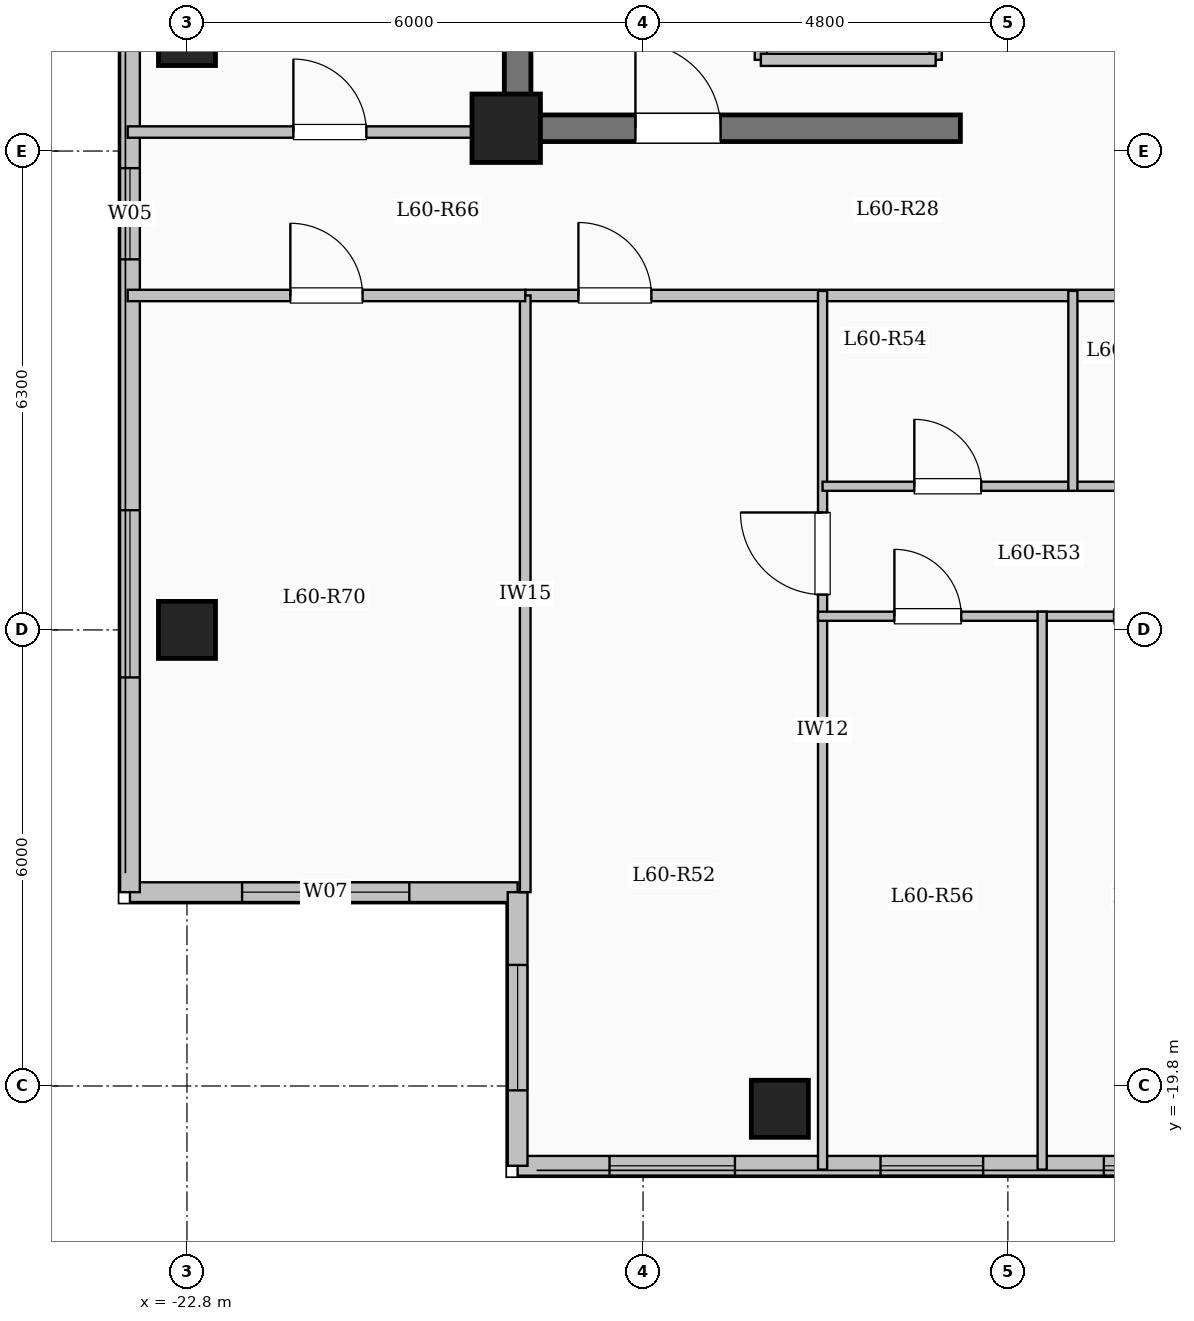
"""IFC4 building model, lengths in metres.
Left out: names, types, materials, properties, quantities, classifications, styles, units other than length and angle.
Written with IfcOpenShell. Run it as: python <this file> out.ifc"""

import sys

from ifc_helpers import new_model, si_unit, direction, frame, frame_2d, origin, origin_2d, place, context, subcontext, project, spatial, rectangle, extrude, element, fill, save


model = new_model("IFC4")
c1 = context("Model", 3, precision=1e-05, world=origin(), true_north=direction((0.0, 1.0)))
c2 = subcontext(c1, "Body", "Model", "MODEL_VIEW")
j1 = project(units=[si_unit("LENGTHUNIT", "METRE"), si_unit("PLANEANGLEUNIT", "RADIAN")], contexts=[c1])
p1 = place(None, origin())
s1 = spatial("IfcSite", under=j1, at=p1, CompositionType="ELEMENT")
p2 = place(p1, origin())
s2 = spatial("IfcBuilding", under=s1, at=p2, CompositionType="ELEMENT")
p3 = place(p2, frame((0.0, 0.0, 220.4)))
s3 = spatial("IfcBuildingStorey", under=s2, at=p3, CompositionType="ELEMENT", Elevation=220.4)
p4 = place(p3, frame((-18.6, -7.2, 0.0), z_axis=(0.0, 0.0, 1.0), x_axis=(1.0, 0.0, 0.0)))
e1 = element("IfcColumn", 1, at=p4, inside=s3, PredefinedType="COLUMN", context=c2, shape_type="SweptSolid", body=[
    extrude(rectangle(XDim=0.9, YDim=0.9, at=origin_2d()), origin(), (0.0, 0.0, 1.0), 3.35),
])
for number, where, z_axis, x_axis in (
    (2, (-15.0, -20.1, 0.0), (0.0, 0.0, 1.0), (1.0, 0.0, 0.0)),
    (3, (-22.8, -13.8, 0.0), (0.0, 0.0, 1.0), (1.0, 0.0, 0.0)),
    (4, (-22.8, -6.0, 0.0), (0.0, 0.0, 1.0), (1.0, 0.0, 0.0)),
):
    element("IfcColumn", number, at=place(p3, frame(where, z_axis=z_axis, x_axis=x_axis)), inside=s3, PredefinedType="COLUMN", context=c2, shape_type="SweptSolid", body=[
        extrude(rectangle(XDim=0.75, YDim=0.75, at=origin_2d()), origin(), (0.0, 0.0, 1.0), 3.35),
    ])
p5 = place(p3, frame((-18.45, -17.25, 0.0), z_axis=(0.0, 0.0, 1.0), x_axis=(-1.0, 0.0, 0.0)))
e5 = element("IfcWall", 5, at=p5, inside=s3, PredefinedType="SOLIDWALL", context=c2, shape_type="SweptSolid", body=[
    extrude(rectangle(XDim=5.1, YDim=0.26, at=frame_2d((2.55, 0.0))), origin(), (0.0, 0.0, 1.0), 3.1),
])
p6 = place(p5, frame((1.425, 0.0, 0.9)))
e6 = element("IfcOpeningElement", 6, at=p6, cuts=e5, PredefinedType="OPENING", context=c2, shape_type="SweptSolid", body=[
    extrude(rectangle(XDim=2.2, YDim=1.75, at=frame_2d((1.1, 0.875))), frame((0.0, 0.14, 0.0), z_axis=(0.0, -1.0, 0.0), x_axis=(1.0, 0.0, 0.0)), (0.0, 0.0, 1.0), 0.28),
])
p7 = place(p3, frame((-23.55, -17.25, 0.0), z_axis=(0.0, 0.0, 1.0), x_axis=(0.0, 1.0, 0.0)))
e7 = element("IfcWall", 7, at=p7, inside=s3, PredefinedType="SOLIDWALL", context=c2, shape_type="SweptSolid", body=[
    extrude(rectangle(XDim=34.5, YDim=0.26, at=frame_2d((17.25, 0.0))), origin(), (0.0, 0.0, 1.0), 3.1),
])
p8 = place(p7, frame((2.825, 0.0, 0.9)))
e8 = element("IfcOpeningElement", 8, at=p8, cuts=e7, PredefinedType="OPENING", context=c2, shape_type="SweptSolid", body=[
    extrude(rectangle(XDim=2.2, YDim=1.75, at=frame_2d((1.1, 0.875))), frame((0.0, 0.14, 0.0), z_axis=(0.0, -1.0, 0.0), x_axis=(1.0, 0.0, 0.0)), (0.0, 0.0, 1.0), 0.28),
])
p9 = place(p7, frame((8.325, 0.0, 0.95)))
e9 = element("IfcOpeningElement", 9, at=p9, cuts=e7, PredefinedType="OPENING", context=c2, shape_type="SweptSolid", body=[
    extrude(rectangle(XDim=1.2, YDim=1.5, at=frame_2d((0.6, 0.75))), frame((0.0, 0.14, 0.0), z_axis=(0.0, -1.0, 0.0), x_axis=(1.0, 0.0, 0.0)), (0.0, 0.0, 1.0), 0.28),
])
p10 = place(p7, frame((13.25, 0.0, 0.9)))
e10 = element("IfcOpeningElement", 10, at=p10, cuts=e7, PredefinedType="OPENING", context=c2, shape_type="SweptSolid", body=[
    extrude(rectangle(XDim=2.2, YDim=1.75, at=frame_2d((1.1, 0.875))), frame((0.0, 0.14, 0.0), z_axis=(0.0, -1.0, 0.0), x_axis=(1.0, 0.0, 0.0)), (0.0, 0.0, 1.0), 0.28),
])
p11 = place(p7, frame((19.65, 0.0, 0.9)))
e11 = element("IfcOpeningElement", 11, at=p11, cuts=e7, PredefinedType="OPENING", context=c2, shape_type="SweptSolid", body=[
    extrude(rectangle(XDim=1.65, YDim=1.6, at=frame_2d((0.825, 0.8))), frame((0.0, 0.14, 0.0), z_axis=(0.0, -1.0, 0.0), x_axis=(1.0, 0.0, 0.0)), (0.0, 0.0, 1.0), 0.28),
])
p12 = place(p7, frame((24.125, 0.0, 0.9)))
e12 = element("IfcOpeningElement", 12, at=p12, cuts=e7, PredefinedType="OPENING", context=c2, shape_type="SweptSolid", body=[
    extrude(rectangle(XDim=2.0, YDim=1.7, at=frame_2d((1.0, 0.85))), frame((0.0, 0.14, 0.0), z_axis=(0.0, -1.0, 0.0), x_axis=(1.0, 0.0, 0.0)), (0.0, 0.0, 1.0), 0.28),
])
p13 = place(p7, frame((28.375, 0.0, 0.95)))
e13 = element("IfcOpeningElement", 13, at=p13, cuts=e7, PredefinedType="OPENING", context=c2, shape_type="SweptSolid", body=[
    extrude(rectangle(XDim=1.0, YDim=1.5, at=frame_2d((0.5, 0.75))), frame((0.0, 0.14, 0.0), z_axis=(0.0, -1.0, 0.0), x_axis=(1.0, 0.0, 0.0)), (0.0, 0.0, 1.0), 0.28),
])
p14 = place(p7, frame((31.125, 0.0, 0.9)))
e14 = element("IfcOpeningElement", 14, at=p14, cuts=e7, PredefinedType="OPENING", context=c2, shape_type="SweptSolid", body=[
    extrude(rectangle(XDim=2.0, YDim=1.7, at=frame_2d((1.0, 0.85))), frame((0.0, 0.14, 0.0), z_axis=(0.0, -1.0, 0.0), x_axis=(1.0, 0.0, 0.0)), (0.0, 0.0, 1.0), 0.28),
])
p15 = place(p3, frame((-7.35, -20.85, 0.0), z_axis=(0.0, 0.0, 1.0), x_axis=(-1.0, 0.0, 0.0)))
e15 = element("IfcWall", 15, at=p15, inside=s3, PredefinedType="SOLIDWALL", context=c2, shape_type="SweptSolid", body=[
    extrude(rectangle(XDim=11.1, YDim=0.26, at=frame_2d((5.55, 0.0))), origin(), (0.0, 0.0, 1.0), 3.1),
])
p16 = place(p15, frame((2.037, 0.0, 0.95)))
e16 = element("IfcOpeningElement", 16, at=p16, cuts=e15, PredefinedType="OPENING", context=c2, shape_type="SweptSolid", body=[
    extrude(rectangle(XDim=1.35, YDim=1.55, at=frame_2d((0.675, 0.775))), frame((0.0, 0.14, 0.0), z_axis=(0.0, -1.0, 0.0), x_axis=(1.0, 0.0, 0.0)), (0.0, 0.0, 1.0), 0.28),
])
p17 = place(p15, frame((4.976, 0.0, 0.95)))
e17 = element("IfcOpeningElement", 17, at=p17, cuts=e15, PredefinedType="OPENING", context=c2, shape_type="SweptSolid", body=[
    extrude(rectangle(XDim=1.35, YDim=1.55, at=frame_2d((0.675, 0.775))), frame((0.0, 0.14, 0.0), z_axis=(0.0, -1.0, 0.0), x_axis=(1.0, 0.0, 0.0)), (0.0, 0.0, 1.0), 0.28),
])
p18 = place(p15, frame((8.241, 0.0, 0.9)))
e18 = element("IfcOpeningElement", 18, at=p18, cuts=e15, PredefinedType="OPENING", context=c2, shape_type="SweptSolid", body=[
    extrude(rectangle(XDim=1.65, YDim=1.6, at=frame_2d((0.825, 0.8))), frame((0.0, 0.14, 0.0), z_axis=(0.0, -1.0, 0.0), x_axis=(1.0, 0.0, 0.0)), (0.0, 0.0, 1.0), 0.28),
])
p19 = place(p3, frame((-18.45, -20.85, 0.0), z_axis=(0.0, 0.0, 1.0), x_axis=(0.0, 1.0, 0.0)))
e19 = element("IfcWall", 19, at=p19, inside=s3, PredefinedType="SOLIDWALL", context=c2, shape_type="SweptSolid", body=[
    extrude(rectangle(XDim=3.6, YDim=0.26, at=frame_2d((1.8, 0.0))), origin(), (0.0, 0.0, 1.0), 3.1),
])
p20 = place(p19, frame((0.992, 0.0, 0.9)))
e20 = element("IfcOpeningElement", 20, at=p20, cuts=e19, PredefinedType="OPENING", context=c2, shape_type="SweptSolid", body=[
    extrude(rectangle(XDim=1.65, YDim=1.6, at=frame_2d((0.825, 0.8))), frame((0.0, 0.14, 0.0), z_axis=(0.0, -1.0, 0.0), x_axis=(1.0, 0.0, 0.0)), (0.0, 0.0, 1.0), 0.28),
])
p21 = place(p3, frame((-15.25, -6.3, 0.0), z_axis=(0.0, 0.0, 1.0), x_axis=(0.0, 1.0, 0.0)))
e21 = element("IfcWall", 21, at=p21, inside=s3, PredefinedType="SOLIDWALL", context=c2, shape_type="SweptSolid", body=[
    extrude(rectangle(XDim=2.6, YDim=0.16, at=frame_2d((1.3, 0.0))), origin(), (0.0, 0.0, 1.0), 3.1),
])
p22 = place(p21, frame((0.75, 0.0, 0.0)))
e22 = element("IfcOpeningElement", 22, at=p22, cuts=e21, PredefinedType="OPENING", context=c2, shape_type="SweptSolid", body=[
    extrude(rectangle(XDim=1.1, YDim=2.15, at=frame_2d((0.55, 1.075))), frame((0.0, 0.09, 0.0), z_axis=(0.0, -1.0, 0.0), x_axis=(1.0, 0.0, 0.0)), (0.0, 0.0, 1.0), 0.18),
])
p23 = place(p3, frame((-12.95, -6.3, 0.0), z_axis=(0.0, 0.0, 1.0), x_axis=(0.0, 1.0, 0.0)))
e23 = element("IfcWall", 23, at=p23, inside=s3, PredefinedType="SOLIDWALL", context=c2, shape_type="SweptSolid", body=[
    extrude(rectangle(XDim=2.6, YDim=0.16, at=frame_2d((1.3, 0.0))), origin(), (0.0, 0.0, 1.0), 3.1),
])
p24 = place(p3, frame((-15.25, -6.3, 0.0), z_axis=(0.0, 0.0, 1.0), x_axis=(1.0, 0.0, 0.0)))
e24 = element("IfcWall", 24, at=p24, inside=s3, PredefinedType="SOLIDWALL", context=c2, shape_type="SweptSolid", body=[
    extrude(rectangle(XDim=2.3, YDim=0.16, at=frame_2d((1.15, 0.0))), origin(), (0.0, 0.0, 1.0), 3.1),
])
p25 = place(p3, frame((-18.45, -7.375, 0.0), z_axis=(0.0, 0.0, 1.0), x_axis=(0.0, 1.0, 0.0)))
e25 = element("IfcWall", 25, at=p25, inside=s3, PredefinedType="SHEAR", context=c2, shape_type="SweptSolid", body=[
    extrude(rectangle(XDim=14.05, YDim=0.35, at=frame_2d((7.025, 0.0))), origin(), (0.0, 0.0, 1.0), 3.35),
])
p26 = place(p3, frame((-18.625, -7.2, 0.0), z_axis=(0.0, 0.0, 1.0), x_axis=(1.0, 0.0, 0.0)))
e26 = element("IfcWall", 26, at=p26, inside=s3, PredefinedType="SHEAR", context=c2, shape_type="SweptSolid", body=[
    extrude(rectangle(XDim=6.0, YDim=0.35, at=frame_2d((3.0, 0.0))), origin(), (0.0, 0.0, 1.0), 3.35),
])
p27 = place(p26, frame((1.725, 0.0, 0.0)))
e27 = element("IfcOpeningElement", 27, at=p27, cuts=e26, PredefinedType="OPENING", context=c2, shape_type="SweptSolid", body=[
    extrude(rectangle(XDim=1.12, YDim=2.15, at=frame_2d((0.56, 1.075))), frame((0.0, 0.185, 0.0), z_axis=(0.0, -1.0, 0.0), x_axis=(1.0, 0.0, 0.0)), (0.0, 0.0, 1.0), 0.37),
])
p28 = place(p3, frame((-18.35, -9.4, 0.0), z_axis=(0.0, 0.0, 1.0), x_axis=(1.0, 0.0, 0.0)))
e28 = element("IfcWall", 28, at=p28, inside=s3, PredefinedType="PARTITIONING", context=c2, shape_type="SweptSolid", body=[
    extrude(rectangle(XDim=9.8, YDim=0.15, at=frame_2d((4.9, 0.0))), origin(), (0.0, 0.0, 1.0), 3.1),
])
p29 = place(p28, frame((0.7, 0.0, 0.0)))
e29 = element("IfcOpeningElement", 29, at=p29, cuts=e28, PredefinedType="OPENING", context=c2, shape_type="SweptSolid", body=[
    extrude(rectangle(XDim=0.96, YDim=2.15, at=frame_2d((0.48, 1.075))), frame((0.0, 0.085, 0.0), z_axis=(0.0, -1.0, 0.0), x_axis=(1.0, 0.0, 0.0)), (0.0, 0.0, 1.0), 0.17),
])
p30 = place(p3, frame((-14.438, -20.9, 0.0), z_axis=(0.0, 0.0, 1.0), x_axis=(0.0, 1.0, 0.0)))
e30 = element("IfcWall", 30, at=p30, inside=s3, PredefinedType="PARTITIONING", context=c2, shape_type="SweptSolid", body=[
    extrude(rectangle(XDim=11.56, YDim=0.12, at=frame_2d((5.78, 0.0))), origin(), (0.0, 0.0, 1.0), 3.1),
])
p31 = place(p30, frame((7.565, 0.0, 0.0)))
e31 = element("IfcOpeningElement", 31, at=p31, cuts=e30, PredefinedType="OPENING", context=c2, shape_type="SweptSolid", body=[
    extrude(rectangle(XDim=1.08, YDim=2.15, at=frame_2d((0.54, 1.075))), frame((0.0, 0.07, 0.0), z_axis=(0.0, -1.0, 0.0), x_axis=(1.0, 0.0, 0.0)), (0.0, 0.0, 1.0), 0.14),
])
p32 = place(p3, frame((-14.438, -11.91, 0.0), z_axis=(0.0, 0.0, 1.0), x_axis=(1.0, 0.0, 0.0)))
e32 = element("IfcWall", 32, at=p32, inside=s3, PredefinedType="PARTITIONING", context=c2, shape_type="SweptSolid", body=[
    extrude(rectangle(XDim=3.293, YDim=0.12, at=frame_2d((1.646, 0.0))), origin(), (0.0, 0.0, 1.0), 3.1),
])
p33 = place(p32, frame((1.207, 0.0, 0.0)))
e33 = element("IfcOpeningElement", 33, at=p33, cuts=e32, PredefinedType="OPENING", context=c2, shape_type="SweptSolid", body=[
    extrude(rectangle(XDim=0.88, YDim=2.1, at=frame_2d((0.44, 1.05))), frame((0.0, 0.07, 0.0), z_axis=(0.0, -1.0, 0.0), x_axis=(1.0, 0.0, 0.0)), (0.0, 0.0, 1.0), 0.14),
])
p34 = place(p3, frame((-11.145, -11.91, 0.0), z_axis=(0.0, 0.0, 1.0), x_axis=(1.0, 0.0, 0.0)))
e34 = element("IfcWall", 34, at=p34, inside=s3, PredefinedType="PARTITIONING", context=c2, shape_type="SweptSolid", body=[
    extrude(rectangle(XDim=2.545, YDim=0.12, at=frame_2d((1.272, 0.0))), origin(), (0.0, 0.0, 1.0), 3.1),
])
p35 = place(p34, frame((0.833, 0.0, 0.0)))
e35 = element("IfcOpeningElement", 35, at=p35, cuts=e34, PredefinedType="OPENING", context=c2, shape_type="SweptSolid", body=[
    extrude(rectangle(XDim=0.88, YDim=2.1, at=frame_2d((0.44, 1.05))), frame((0.0, 0.07, 0.0), z_axis=(0.0, -1.0, 0.0), x_axis=(1.0, 0.0, 0.0)), (0.0, 0.0, 1.0), 0.14),
])
p36 = place(p3, frame((-14.498, -13.62, 0.0), z_axis=(0.0, 0.0, 1.0), x_axis=(1.0, 0.0, 0.0)))
e36 = element("IfcWall", 36, at=p36, inside=s3, PredefinedType="PARTITIONING", context=c2, shape_type="SweptSolid", body=[
    extrude(rectangle(XDim=5.958, YDim=0.12, at=frame_2d((2.979, 0.0))), origin(), (0.0, 0.0, 1.0), 3.1),
])
p37 = place(p36, frame((1.005, 0.0, 0.0)))
e37 = element("IfcOpeningElement", 37, at=p37, cuts=e36, PredefinedType="OPENING", context=c2, shape_type="SweptSolid", body=[
    extrude(rectangle(XDim=0.88, YDim=2.1, at=frame_2d((0.44, 1.05))), frame((0.0, 0.07, 0.0), z_axis=(0.0, -1.0, 0.0), x_axis=(1.0, 0.0, 0.0)), (0.0, 0.0, 1.0), 0.14),
])
p38 = place(p36, frame((3.894, 0.0, 0.0)))
e38 = element("IfcOpeningElement", 38, at=p38, cuts=e36, PredefinedType="OPENING", context=c2, shape_type="SweptSolid", body=[
    extrude(rectangle(XDim=0.88, YDim=2.1, at=frame_2d((0.44, 1.05))), frame((0.0, 0.07, 0.0), z_axis=(0.0, -1.0, 0.0), x_axis=(1.0, 0.0, 0.0)), (0.0, 0.0, 1.0), 0.14),
])
p39 = place(p3, frame((-11.145, -11.97, 0.0), z_axis=(0.0, 0.0, 1.0), x_axis=(0.0, 1.0, 0.0)))
e39 = element("IfcWall", 39, at=p39, inside=s3, PredefinedType="PARTITIONING", context=c2, shape_type="SweptSolid", body=[
    extrude(rectangle(XDim=2.63, YDim=0.12, at=frame_2d((1.315, 0.0))), origin(), (0.0, 0.0, 1.0), 3.1),
])
p40 = place(p3, frame((-11.549, -20.9, 0.0), z_axis=(0.0, 0.0, 1.0), x_axis=(0.0, 1.0, 0.0)))
e40 = element("IfcWall", 40, at=p40, inside=s3, PredefinedType="PARTITIONING", context=c2, shape_type="SweptSolid", body=[
    extrude(rectangle(XDim=7.34, YDim=0.12, at=frame_2d((3.67, 0.0))), origin(), (0.0, 0.0, 1.0), 3.1),
])
p41 = place(p3, frame((-23.58, -7.25, 0.0), z_axis=(0.0, 0.0, 1.0), x_axis=(1.0, 0.0, 0.0)))
e41 = element("IfcWall", 41, at=p41, inside=s3, PredefinedType="PARTITIONING", context=c2, shape_type="SweptSolid", body=[
    extrude(rectangle(XDim=5.13, YDim=0.15, at=frame_2d((2.565, 0.0))), origin(), (0.0, 0.0, 1.0), 3.1),
])
p42 = place(p41, frame((2.18, 0.0, 0.0)))
e42 = element("IfcOpeningElement", 42, at=p42, cuts=e41, PredefinedType="OPENING", context=c2, shape_type="SweptSolid", body=[
    extrude(rectangle(XDim=0.96, YDim=2.15, at=frame_2d((0.48, 1.075))), frame((0.0, 0.085, 0.0), z_axis=(0.0, -1.0, 0.0), x_axis=(1.0, 0.0, 0.0)), (0.0, 0.0, 1.0), 0.17),
])
p43 = place(p3, frame((-18.35, -17.25, 0.0), z_axis=(0.0, 0.0, 1.0), x_axis=(0.0, 1.0, 0.0)))
e43 = element("IfcWall", 43, at=p43, inside=s3, PredefinedType="PARTITIONING", context=c2, shape_type="SweptSolid", body=[
    extrude(rectangle(XDim=7.85, YDim=0.14, at=frame_2d((3.925, 0.0))), origin(), (0.0, 0.0, 1.0), 3.1),
])
p44 = place(p3, frame((-23.58, -9.4, 0.0), z_axis=(0.0, 0.0, 1.0), x_axis=(1.0, 0.0, 0.0)))
e44 = element("IfcWall", 44, at=p44, inside=s3, PredefinedType="PARTITIONING", context=c2, shape_type="SweptSolid", body=[
    extrude(rectangle(XDim=5.23, YDim=0.15, at=frame_2d((2.615, 0.0))), origin(), (0.0, 0.0, 1.0), 3.1),
])
p45 = place(p44, frame((2.14, 0.0, 0.0)))
e45 = element("IfcOpeningElement", 45, at=p45, cuts=e44, PredefinedType="OPENING", context=c2, shape_type="SweptSolid", body=[
    extrude(rectangle(XDim=0.95, YDim=2.15, at=frame_2d((0.475, 1.075))), frame((0.0, 0.085, 0.0), z_axis=(0.0, -1.0, 0.0), x_axis=(1.0, 0.0, 0.0)), (0.0, 0.0, 1.0), 0.17),
])
p46 = place(p6, origin())
e46 = element("IfcWindow", 46, at=p46, inside=s3, PartitioningType="SINGLE_PANEL", PredefinedType="WINDOW", context=c2, shape_type="SweptSolid", body=[
    extrude(rectangle(XDim=2.2, YDim=1.75, at=frame_2d((1.1, 0.875))), frame((0.0, 0.03, 0.0), z_axis=(0.0, -1.0, 0.0), x_axis=(1.0, 0.0, 0.0)), (0.0, 0.0, 1.0), 0.06),
])
fill(e6, e46)
p47 = place(p8, origin())
e47 = element("IfcWindow", 47, at=p47, inside=s3, PartitioningType="SINGLE_PANEL", PredefinedType="WINDOW", context=c2, shape_type="SweptSolid", body=[
    extrude(rectangle(XDim=2.2, YDim=1.75, at=frame_2d((1.1, 0.875))), frame((0.0, 0.03, 0.0), z_axis=(0.0, -1.0, 0.0), x_axis=(1.0, 0.0, 0.0)), (0.0, 0.0, 1.0), 0.06),
])
fill(e8, e47)
p48 = place(p9, origin())
e48 = element("IfcWindow", 48, at=p48, inside=s3, PartitioningType="SINGLE_PANEL", PredefinedType="WINDOW", context=c2, shape_type="SweptSolid", body=[
    extrude(rectangle(XDim=1.2, YDim=1.5, at=frame_2d((0.6, 0.75))), frame((0.0, 0.03, 0.0), z_axis=(0.0, -1.0, 0.0), x_axis=(1.0, 0.0, 0.0)), (0.0, 0.0, 1.0), 0.06),
])
fill(e9, e48)
p49 = place(p16, origin())
e49 = element("IfcWindow", 49, at=p49, inside=s3, PartitioningType="SINGLE_PANEL", PredefinedType="WINDOW", context=c2, shape_type="SweptSolid", body=[
    extrude(rectangle(XDim=1.35, YDim=1.55, at=frame_2d((0.675, 0.775))), frame((0.0, 0.03, 0.0), z_axis=(0.0, -1.0, 0.0), x_axis=(1.0, 0.0, 0.0)), (0.0, 0.0, 1.0), 0.06),
])
fill(e16, e49)
p50 = place(p17, origin())
e50 = element("IfcWindow", 50, at=p50, inside=s3, PartitioningType="SINGLE_PANEL", PredefinedType="WINDOW", context=c2, shape_type="SweptSolid", body=[
    extrude(rectangle(XDim=1.35, YDim=1.55, at=frame_2d((0.675, 0.775))), frame((0.0, 0.03, 0.0), z_axis=(0.0, -1.0, 0.0), x_axis=(1.0, 0.0, 0.0)), (0.0, 0.0, 1.0), 0.06),
])
fill(e17, e50)
p51 = place(p18, origin())
e51 = element("IfcWindow", 51, at=p51, inside=s3, PartitioningType="SINGLE_PANEL", PredefinedType="WINDOW", context=c2, shape_type="SweptSolid", body=[
    extrude(rectangle(XDim=1.65, YDim=1.6, at=frame_2d((0.825, 0.8))), frame((0.0, 0.03, 0.0), z_axis=(0.0, -1.0, 0.0), x_axis=(1.0, 0.0, 0.0)), (0.0, 0.0, 1.0), 0.06),
])
fill(e18, e51)
p52 = place(p20, origin())
e52 = element("IfcWindow", 52, at=p52, inside=s3, PartitioningType="SINGLE_PANEL", PredefinedType="WINDOW", context=c2, shape_type="SweptSolid", body=[
    extrude(rectangle(XDim=1.65, YDim=1.6, at=frame_2d((0.825, 0.8))), frame((0.0, 0.03, 0.0), z_axis=(0.0, -1.0, 0.0), x_axis=(1.0, 0.0, 0.0)), (0.0, 0.0, 1.0), 0.06),
])
fill(e20, e52)
p53 = place(p27, origin())
e53 = element("IfcDoor", 53, at=p53, inside=s3, OperationType="SINGLE_SWING_LEFT", PredefinedType="DOOR", context=c2, shape_type="SweptSolid", body=[
    extrude(rectangle(XDim=1.12, YDim=2.15, at=frame_2d((0.56, 1.075))), frame((0.0, 0.025, 0.0), z_axis=(0.0, -1.0, 0.0), x_axis=(1.0, 0.0, 0.0)), (0.0, 0.0, 1.0), 0.05),
])
fill(e27, e53)
p54 = place(p29, origin())
e54 = element("IfcDoor", 54, at=p54, inside=s3, OperationType="SINGLE_SWING_LEFT", PredefinedType="DOOR", context=c2, shape_type="SweptSolid", body=[
    extrude(rectangle(XDim=0.96, YDim=2.15, at=frame_2d((0.48, 1.075))), frame((0.0, 0.025, 0.0), z_axis=(0.0, -1.0, 0.0), x_axis=(1.0, 0.0, 0.0)), (0.0, 0.0, 1.0), 0.05),
])
fill(e29, e54)
p55 = place(p31, origin())
e55 = element("IfcDoor", 55, at=p55, inside=s3, OperationType="SINGLE_SWING_RIGHT", PredefinedType="DOOR", context=c2, shape_type="SweptSolid", body=[
    extrude(rectangle(XDim=1.08, YDim=2.15, at=frame_2d((0.54, 1.075))), frame((0.0, 0.025, 0.0), z_axis=(0.0, -1.0, 0.0), x_axis=(1.0, 0.0, 0.0)), (0.0, 0.0, 1.0), 0.05),
])
fill(e31, e55)
p56 = place(p33, origin())
e56 = element("IfcDoor", 56, at=p56, inside=s3, OperationType="SINGLE_SWING_LEFT", PredefinedType="DOOR", context=c2, shape_type="SweptSolid", body=[
    extrude(rectangle(XDim=0.88, YDim=2.1, at=frame_2d((0.44, 1.05))), frame((0.0, 0.025, 0.0), z_axis=(0.0, -1.0, 0.0), x_axis=(1.0, 0.0, 0.0)), (0.0, 0.0, 1.0), 0.05),
])
fill(e33, e56)
p57 = place(p37, origin())
e57 = element("IfcDoor", 57, at=p57, inside=s3, OperationType="SINGLE_SWING_LEFT", PredefinedType="DOOR", context=c2, shape_type="SweptSolid", body=[
    extrude(rectangle(XDim=0.88, YDim=2.1, at=frame_2d((0.44, 1.05))), frame((0.0, 0.025, 0.0), z_axis=(0.0, -1.0, 0.0), x_axis=(1.0, 0.0, 0.0)), (0.0, 0.0, 1.0), 0.05),
])
fill(e37, e57)
p58 = place(p45, origin())
e58 = element("IfcDoor", 58, at=p58, inside=s3, OperationType="SINGLE_SWING_LEFT", PredefinedType="DOOR", context=c2, shape_type="SweptSolid", body=[
    extrude(rectangle(XDim=0.95, YDim=2.15, at=frame_2d((0.475, 1.075))), frame((0.0, 0.025, 0.0), z_axis=(0.0, -1.0, 0.0), x_axis=(1.0, 0.0, 0.0)), (0.0, 0.0, 1.0), 0.05),
])
fill(e45, e58)
p59 = place(p42, origin())
e59 = element("IfcDoor", 59, at=p59, inside=s3, OperationType="SINGLE_SWING_LEFT", PredefinedType="DOOR", context=c2, shape_type="SweptSolid", body=[
    extrude(rectangle(XDim=0.96, YDim=2.15, at=frame_2d((0.48, 1.075))), frame((0.0, 0.025, 0.0), z_axis=(0.0, -1.0, 0.0), x_axis=(1.0, 0.0, 0.0)), (0.0, 0.0, 1.0), 0.05),
])
fill(e42, e59)
save(model, sys.argv[1])
